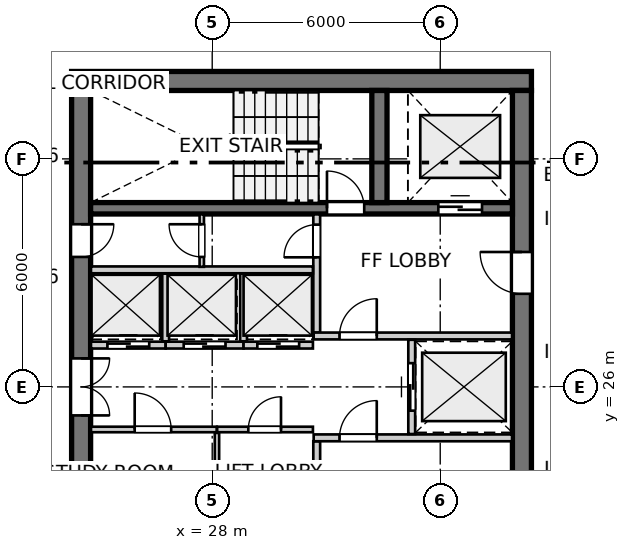
"""IFC4 building model, lengths in metres.
Left out: names, types, materials, properties, quantities, classifications, styles, units other than length and angle.
Written with IfcOpenShell. Run it as: python <this file> out.ifc"""

import sys

from ifc_helpers import new_model, si_unit, direction, frame, frame_2d, origin, place, context, subcontext, project, spatial, rectangle, extrude, source, transform, mapped, element, fill, save


model = new_model("IFC4")
c1 = context("Model", 3, precision=1e-05, world=origin(), true_north=direction((0.0, 1.0)))
c2 = subcontext(c1, "Body", "Model", "MODEL_VIEW")
j1 = project(units=[si_unit("LENGTHUNIT", "METRE"), si_unit("PLANEANGLEUNIT", "RADIAN")], contexts=[c1])
p1 = place(None, origin())
s1 = spatial("IfcSite", under=j1, at=p1, CompositionType="ELEMENT")
p2 = place(p1, origin())
s2 = spatial("IfcBuilding", under=s1, at=p2, CompositionType="ELEMENT")
p3 = place(p2, frame((0.0, 0.0, 208.4)))
s3 = spatial("IfcBuildingStorey", under=s2, at=p3, CompositionType="ELEMENT", Elevation=208.4)
p4 = place(p3, frame((36.4, 34.05, 0.0), z_axis=(0.0, 0.0, 1.0), x_axis=(-1.0, 0.0, 0.0)))
e1 = element("IfcWall", 1, at=p4, inside=s3, PredefinedType="SHEAR", context=c2, shape_type="SweptSolid", body=[
    extrude(rectangle(XDim=12.1, YDim=0.5, at=frame_2d((6.05, 0.0))), origin(), (0.0, 0.0, 1.0), 2.935),
])
p5 = place(p3, frame((24.55, 33.8, 0.0), z_axis=(0.0, 0.0, 1.0), x_axis=(0.0, -1.0, 0.0)))
e2 = element("IfcWall", 2, at=p5, inside=s3, PredefinedType="SHEAR", context=c2, shape_type="SweptSolid", body=[
    extrude(rectangle(XDim=15.6, YDim=0.5, at=frame_2d((7.8, 0.0))), origin(), (0.0, 0.0, 1.0), 2.935),
])
p6 = place(p5, frame((7.05, 0.0, 0.0)))
e3 = element("IfcOpeningElement", 3, at=p6, cuts=e2, PredefinedType="OPENING", context=c2, shape_type="SweptSolid", body=[
    extrude(rectangle(XDim=1.5, YDim=2.15, at=frame_2d((0.75, 1.075))), frame((0.0, 0.26, 0.0), z_axis=(0.0, -1.0, 0.0), x_axis=(1.0, 0.0, 0.0)), (0.0, 0.0, 1.0), 0.52),
])
p7 = place(p5, frame((3.52, 0.0, 0.0)))
e4 = element("IfcOpeningElement", 4, at=p7, cuts=e2, PredefinedType="OPENING", context=c2, shape_type="SweptSolid", body=[
    extrude(rectangle(XDim=0.86, YDim=2.05, at=frame_2d((0.43, 1.025))), frame((0.0, 0.26, 0.0), z_axis=(0.0, -1.0, 0.0), x_axis=(1.0, 0.0, 0.0)), (0.0, 0.0, 1.0), 0.52),
])
p8 = place(p5, frame((11.22, 0.0, 0.0)))
e5 = element("IfcOpeningElement", 5, at=p8, cuts=e2, PredefinedType="OPENING", context=c2, shape_type="SweptSolid", body=[
    extrude(rectangle(XDim=0.86, YDim=2.05, at=frame_2d((0.43, 1.025))), frame((0.0, 0.26, 0.0), z_axis=(0.0, -1.0, 0.0), x_axis=(1.0, 0.0, 0.0)), (0.0, 0.0, 1.0), 0.52),
])
p9 = place(p3, frame((36.15, 18.2, 0.0), z_axis=(0.0, 0.0, 1.0), x_axis=(0.0, 1.0, 0.0)))
e6 = element("IfcWall", 6, at=p9, inside=s3, PredefinedType="SHEAR", context=c2, shape_type="SweptSolid", body=[
    extrude(rectangle(XDim=15.6, YDim=0.5, at=frame_2d((7.8, 0.0))), origin(), (0.0, 0.0, 1.0), 2.935),
])
p10 = place(p9, frame((4.25, 0.0, 0.0)))
e7 = element("IfcOpeningElement", 7, at=p10, cuts=e6, PredefinedType="OPENING", context=c2, shape_type="SweptSolid", body=[
    extrude(rectangle(XDim=1.1, YDim=2.15, at=frame_2d((0.55, 1.075))), frame((0.0, 0.26, 0.0), z_axis=(0.0, -1.0, 0.0), x_axis=(1.0, 0.0, 0.0)), (0.0, 0.0, 1.0), 0.52),
])
p11 = place(p9, frame((10.25, 0.0, 0.0)))
e8 = element("IfcOpeningElement", 8, at=p11, cuts=e6, PredefinedType="OPENING", context=c2, shape_type="SweptSolid", body=[
    extrude(rectangle(XDim=1.1, YDim=2.15, at=frame_2d((0.55, 1.075))), frame((0.0, 0.26, 0.0), z_axis=(0.0, -1.0, 0.0), x_axis=(1.0, 0.0, 0.0)), (0.0, 0.0, 1.0), 0.52),
])
p12 = place(p3, frame((24.8, 30.7, 0.0), z_axis=(0.0, 0.0, 1.0), x_axis=(1.0, 0.0, 0.0)))
e9 = element("IfcWall", 9, at=p12, inside=s3, PredefinedType="SHEAR", context=c2, shape_type="SweptSolid", body=[
    extrude(rectangle(XDim=11.1, YDim=0.3, at=frame_2d((5.55, 0.0))), origin(), (0.0, 0.0, 1.0), 2.935),
])
p13 = place(p12, frame((6.22, 0.0, 0.0)))
e10 = element("IfcOpeningElement", 10, at=p13, cuts=e9, PredefinedType="OPENING", context=c2, shape_type="SweptSolid", body=[
    extrude(rectangle(XDim=0.98, YDim=2.15, at=frame_2d((0.49, 1.075))), frame((0.0, 0.16, 0.0), z_axis=(0.0, -1.0, 0.0), x_axis=(1.0, 0.0, 0.0)), (0.0, 0.0, 1.0), 0.32),
])
p14 = place(p12, frame((9.15, 0.0, 0.0)))
e11 = element("IfcOpeningElement", 11, at=p14, cuts=e9, PredefinedType="OPENING", context=c2, shape_type="SweptSolid", body=[
    extrude(rectangle(XDim=1.15, YDim=2.15, at=frame_2d((0.575, 1.075))), frame((0.0, 0.16, 0.0), z_axis=(0.0, -1.0, 0.0), x_axis=(1.0, 0.0, 0.0)), (0.0, 0.0, 1.0), 0.32),
])
p15 = place(p3, frame((32.4, 30.85, 0.0), z_axis=(0.0, 0.0, 1.0), x_axis=(0.0, 1.0, 0.0)))
e12 = element("IfcWall", 12, at=p15, inside=s3, PredefinedType="SHEAR", context=c2, shape_type="SweptSolid", body=[
    extrude(rectangle(XDim=2.95, YDim=0.4, at=frame_2d((1.475, 0.0))), origin(), (0.0, 0.0, 1.0), 2.935),
])
p16 = place(p3, frame((30.75, 21.46, 0.0), z_axis=(0.0, 0.0, 1.0), x_axis=(0.0, 1.0, 0.0)))
e13 = element("IfcWall", 13, at=p16, inside=s3, PredefinedType="PARTITIONING", context=c2, shape_type="SweptSolid", body=[
    extrude(rectangle(XDim=3.11, YDim=0.18, at=frame_2d((1.555, 0.0))), origin(), (0.0, 0.0, 1.0), 2.935),
])
p17 = place(p16, frame((0.26, 0.0, 0.0)))
e14 = element("IfcOpeningElement", 14, at=p17, cuts=e13, PredefinedType="OPENING", context=c2, shape_type="SweptSolid", body=[
    extrude(rectangle(XDim=0.86, YDim=2.05, at=frame_2d((0.43, 1.025))), frame((0.0, 0.1, 0.0), z_axis=(0.0, -1.0, 0.0), x_axis=(1.0, 0.0, 0.0)), (0.0, 0.0, 1.0), 0.2),
])
p18 = place(p3, frame((30.67, 24.66, 0.0), z_axis=(0.0, 0.0, 1.0), x_axis=(1.0, 0.0, 0.0)))
e15 = element("IfcWall", 15, at=p18, inside=s3, PredefinedType="PARTITIONING", context=c2, shape_type="SweptSolid", body=[
    extrude(rectangle(XDim=5.22, YDim=0.18, at=frame_2d((2.61, 0.0))), origin(), (0.0, 0.0, 1.0), 2.935),
])
p19 = place(p18, frame((0.68, 0.0, 0.0)))
e16 = element("IfcOpeningElement", 16, at=p19, cuts=e15, PredefinedType="OPENING", context=c2, shape_type="SweptSolid", body=[
    extrude(rectangle(XDim=0.98, YDim=2.15, at=frame_2d((0.49, 1.075))), frame((0.0, 0.1, 0.0), z_axis=(0.0, -1.0, 0.0), x_axis=(1.0, 0.0, 0.0)), (0.0, 0.0, 1.0), 0.2),
])
p20 = place(p3, frame((30.75, 27.43, 0.0), z_axis=(0.0, 0.0, 1.0), x_axis=(0.0, 1.0, 0.0)))
e17 = element("IfcWall", 17, at=p20, inside=s3, PredefinedType="PARTITIONING", context=c2, shape_type="SweptSolid", body=[
    extrude(rectangle(XDim=3.11, YDim=0.18, at=frame_2d((1.555, 0.0))), origin(), (0.0, 0.0, 1.0), 2.935),
])
p21 = place(p20, frame((1.98, 0.0, 0.0)))
e18 = element("IfcOpeningElement", 18, at=p21, cuts=e17, PredefinedType="OPENING", context=c2, shape_type="SweptSolid", body=[
    extrude(rectangle(XDim=0.86, YDim=2.05, at=frame_2d((0.43, 1.025))), frame((0.0, 0.1, 0.0), z_axis=(0.0, -1.0, 0.0), x_axis=(1.0, 0.0, 0.0)), (0.0, 0.0, 1.0), 0.2),
])
p22 = place(p3, frame((30.67, 27.34, 0.0), z_axis=(0.0, 0.0, 1.0), x_axis=(1.0, 0.0, 0.0)))
e19 = element("IfcWall", 19, at=p22, inside=s3, PredefinedType="PARTITIONING", context=c2, shape_type="SweptSolid", body=[
    extrude(rectangle(XDim=5.22, YDim=0.18, at=frame_2d((2.61, 0.0))), origin(), (0.0, 0.0, 1.0), 2.935),
])
p23 = place(p22, frame((0.68, 0.0, 0.0)))
e20 = element("IfcOpeningElement", 20, at=p23, cuts=e19, PredefinedType="OPENING", context=c2, shape_type="SweptSolid", body=[
    extrude(rectangle(XDim=0.98, YDim=2.15, at=frame_2d((0.49, 1.075))), frame((0.0, 0.1, 0.0), z_axis=(0.0, -1.0, 0.0), x_axis=(1.0, 0.0, 0.0)), (0.0, 0.0, 1.0), 0.2),
])
p24 = place(p3, frame((33.25, 24.76, 0.0), z_axis=(0.0, 0.0, 1.0), x_axis=(0.0, 1.0, 0.0)))
e21 = element("IfcWall", 21, at=p24, inside=s3, PredefinedType="PARTITIONING", context=c2, shape_type="SweptSolid", body=[
    extrude(rectangle(XDim=2.48, YDim=0.18, at=frame_2d((1.24, 0.0))), origin(), (0.0, 0.0, 1.0), 2.935),
])
p25 = place(p24, frame((0.615, 0.0, 0.0)))
e22 = element("IfcOpeningElement", 22, at=p25, cuts=e21, PredefinedType="OPENING", context=c2, shape_type="SweptSolid", body=[
    extrude(rectangle(XDim=1.25, YDim=2.15, at=frame_2d((0.625, 1.075))), frame((0.0, 0.1, 0.0), z_axis=(0.0, -1.0, 0.0), x_axis=(1.0, 0.0, 0.0)), (0.0, 0.0, 1.0), 0.2),
])
p26 = place(p3, frame((24.81, 24.88, 0.0), z_axis=(0.0, 0.0, 1.0), x_axis=(1.0, 0.0, 0.0)))
e23 = element("IfcWall", 23, at=p26, inside=s3, PredefinedType="PARTITIONING", context=c2, shape_type="SweptSolid", body=[
    extrude(rectangle(XDim=3.31, YDim=0.145, at=frame_2d((1.655, 0.0))), origin(), (0.0, 0.0, 1.0), 2.935),
])
p27 = place(p26, frame((1.15, 0.0, 0.0)))
e24 = element("IfcOpeningElement", 24, at=p27, cuts=e23, PredefinedType="OPENING", context=c2, shape_type="SweptSolid", body=[
    extrude(rectangle(XDim=0.96, YDim=2.1, at=frame_2d((0.48, 1.05))), frame((0.0, 0.083, 0.0), z_axis=(0.0, -1.0, 0.0), x_axis=(1.0, 0.0, 0.0)), (0.0, 0.0, 1.0), 0.165),
])
p28 = place(p3, frame((28.13, 24.88, 0.0), z_axis=(0.0, 0.0, 1.0), x_axis=(1.0, 0.0, 0.0)))
e25 = element("IfcWall", 25, at=p28, inside=s3, PredefinedType="PARTITIONING", context=c2, shape_type="SweptSolid", body=[
    extrude(rectangle(XDim=2.52, YDim=0.145, at=frame_2d((1.26, 0.0))), origin(), (0.0, 0.0, 1.0), 2.935),
])
p29 = place(p28, frame((0.82, 0.0, 0.0)))
e26 = element("IfcOpeningElement", 26, at=p29, cuts=e25, PredefinedType="OPENING", context=c2, shape_type="SweptSolid", body=[
    extrude(rectangle(XDim=0.86, YDim=2.05, at=frame_2d((0.43, 1.025))), frame((0.0, 0.083, 0.0), z_axis=(0.0, -1.0, 0.0), x_axis=(1.0, 0.0, 0.0)), (0.0, 0.0, 1.0), 0.165),
])
p30 = place(p3, frame((28.125, 23.02, 0.0), z_axis=(0.0, 0.0, 1.0), x_axis=(0.0, 1.0, 0.0)))
e27 = element("IfcWall", 27, at=p30, inside=s3, PredefinedType="PARTITIONING", context=c2, shape_type="SweptSolid", body=[
    extrude(rectangle(XDim=1.77, YDim=0.115, at=frame_2d((0.885, 0.0))), origin(), (0.0, 0.0, 1.0), 2.935),
])
p31 = place(p3, frame((24.81, 29.08, 0.0), z_axis=(0.0, 0.0, 1.0), x_axis=(1.0, 0.0, 0.0)))
e28 = element("IfcWall", 28, at=p31, inside=s3, PredefinedType="PARTITIONING", context=c2, shape_type="SweptSolid", body=[
    extrude(rectangle(XDim=5.84, YDim=0.18, at=frame_2d((2.92, 0.0))), origin(), (0.0, 0.0, 1.0), 2.935),
])
p32 = place(p3, frame((24.81, 27.1, 0.0), z_axis=(0.0, 0.0, 1.0), x_axis=(1.0, 0.0, 0.0)))
e29 = element("IfcWall", 29, at=p32, inside=s3, PredefinedType="PARTITIONING", context=c2, shape_type="SweptSolid", body=[
    extrude(rectangle(XDim=1.965, YDim=0.18, at=frame_2d((0.982, 0.0))), origin(), (0.0, 0.0, 1.0), 2.935),
])
p33 = place(p32, frame((0.433, 0.0, 0.0)))
e30 = element("IfcOpeningElement", 30, at=p33, cuts=e29, PredefinedType="OPENING", context=c2, shape_type="SweptSolid", body=[
    extrude(rectangle(XDim=1.1, YDim=2.15, at=frame_2d((0.55, 1.075))), frame((0.0, 0.1, 0.0), z_axis=(0.0, -1.0, 0.0), x_axis=(1.0, 0.0, 0.0)), (0.0, 0.0, 1.0), 0.2),
])
p34 = place(p3, frame((26.775, 27.1, 0.0), z_axis=(0.0, 0.0, 1.0), x_axis=(1.0, 0.0, 0.0)))
e31 = element("IfcWall", 31, at=p34, inside=s3, PredefinedType="PARTITIONING", context=c2, shape_type="SweptSolid", body=[
    extrude(rectangle(XDim=2.05, YDim=0.18, at=frame_2d((1.025, 0.0))), origin(), (0.0, 0.0, 1.0), 2.935),
])
p35 = place(p34, frame((0.475, 0.0, 0.0)))
e32 = element("IfcOpeningElement", 32, at=p35, cuts=e31, PredefinedType="OPENING", context=c2, shape_type="SweptSolid", body=[
    extrude(rectangle(XDim=1.1, YDim=2.15, at=frame_2d((0.55, 1.075))), frame((0.0, 0.1, 0.0), z_axis=(0.0, -1.0, 0.0), x_axis=(1.0, 0.0, 0.0)), (0.0, 0.0, 1.0), 0.2),
])
p36 = place(p3, frame((26.775, 27.2, 0.0), z_axis=(0.0, 0.0, 1.0), x_axis=(0.0, 1.0, 0.0)))
e33 = element("IfcWall", 33, at=p36, inside=s3, PredefinedType="PARTITIONING", context=c2, shape_type="SweptSolid", body=[
    extrude(rectangle(XDim=1.78, YDim=0.18, at=frame_2d((0.89, 0.0))), origin(), (0.0, 0.0, 1.0), 2.935),
])
p37 = place(p3, frame((28.825, 27.1, 0.0), z_axis=(0.0, 0.0, 1.0), x_axis=(1.0, 0.0, 0.0)))
e34 = element("IfcWall", 34, at=p37, inside=s3, PredefinedType="PARTITIONING", context=c2, shape_type="SweptSolid", body=[
    extrude(rectangle(XDim=1.825, YDim=0.18, at=frame_2d((0.913, 0.0))), origin(), (0.0, 0.0, 1.0), 2.935),
])
p38 = place(p37, frame((0.363, 0.0, 0.0)))
e35 = element("IfcOpeningElement", 35, at=p38, cuts=e34, PredefinedType="OPENING", context=c2, shape_type="SweptSolid", body=[
    extrude(rectangle(XDim=1.1, YDim=2.15, at=frame_2d((0.55, 1.075))), frame((0.0, 0.1, 0.0), z_axis=(0.0, -1.0, 0.0), x_axis=(1.0, 0.0, 0.0)), (0.0, 0.0, 1.0), 0.2),
])
p39 = place(p3, frame((28.825, 27.2, 0.0), z_axis=(0.0, 0.0, 1.0), x_axis=(0.0, 1.0, 0.0)))
e36 = element("IfcWall", 36, at=p39, inside=s3, PredefinedType="PARTITIONING", context=c2, shape_type="SweptSolid", body=[
    extrude(rectangle(XDim=1.78, YDim=0.18, at=frame_2d((0.89, 0.0))), origin(), (0.0, 0.0, 1.0), 2.935),
])
p40 = place(p3, frame((27.725, 29.16, 0.0), z_axis=(0.0, 0.0, 1.0), x_axis=(0.0, 1.0, 0.0)))
e37 = element("IfcWall", 37, at=p40, inside=s3, PredefinedType="PARTITIONING", context=c2, shape_type="SweptSolid", body=[
    extrude(rectangle(XDim=1.38, YDim=0.115, at=frame_2d((0.69, 0.0))), origin(), (0.0, 0.0, 1.0), 2.935),
])
p41 = place(p40, frame((0.26, 0.0, 0.0)))
e38 = element("IfcOpeningElement", 38, at=p41, cuts=e37, PredefinedType="OPENING", context=c2, shape_type="SweptSolid", body=[
    extrude(rectangle(XDim=0.86, YDim=2.05, at=frame_2d((0.43, 1.025))), frame((0.0, 0.067, 0.0), z_axis=(0.0, -1.0, 0.0), x_axis=(1.0, 0.0, 0.0)), (0.0, 0.0, 1.0), 0.135),
])
m1 = source(origin(), c2, "Body", "SweptSolid", [
    extrude(rectangle(XDim=0.98, YDim=2.15, at=frame_2d((0.49, 1.075))), frame((0.0, 0.025, 0.0), z_axis=(0.0, -1.0, 0.0), x_axis=(1.0, 0.0, 0.0)), (0.0, 0.0, 1.0), 0.05),
])
p42 = place(p13, origin())
e39 = element("IfcDoor", 39, at=p42, inside=s3, OperationType="SINGLE_SWING_LEFT", PredefinedType="DOOR", context=c2, shape_type="MappedRepresentation", body=[
    mapped(m1, transform((0.0, 0.0, 0.0), x_axis=(1.0, 0.0, 0.0), y_axis=(0.0, 1.0, 0.0), z_axis=(0.0, 0.0, 1.0), scale=1.0)),
])
fill(e10, e39)
m2 = source(origin(), c2, "Body", "SweptSolid", [
    extrude(rectangle(XDim=1.15, YDim=2.15, at=frame_2d((0.575, 1.075))), frame((0.0, 0.025, 0.0), z_axis=(0.0, -1.0, 0.0), x_axis=(1.0, 0.0, 0.0)), (0.0, 0.0, 1.0), 0.05),
])
p43 = place(p14, origin())
e40 = element("IfcDoor", 40, at=p43, inside=s3, OperationType="DOUBLE_DOOR_SLIDING", PredefinedType="DOOR", context=c2, shape_type="MappedRepresentation", body=[
    mapped(m2, transform((0.0, 0.0, 0.0), x_axis=(1.0, 0.0, 0.0), y_axis=(0.0, 1.0, 0.0), z_axis=(0.0, 0.0, 1.0), scale=1.0)),
])
fill(e11, e40)
m3 = source(origin(), c2, "Body", "SweptSolid", [
    extrude(rectangle(XDim=1.1, YDim=2.15, at=frame_2d((0.55, 1.075))), frame((0.0, 0.025, 0.0), z_axis=(0.0, -1.0, 0.0), x_axis=(1.0, 0.0, 0.0)), (0.0, 0.0, 1.0), 0.05),
])
p44 = place(p11, origin())
e41 = element("IfcDoor", 41, at=p44, inside=s3, OperationType="SINGLE_SWING_RIGHT", PredefinedType="DOOR", context=c2, shape_type="MappedRepresentation", body=[
    mapped(m3, transform((0.0, 0.0, 0.0), x_axis=(1.0, 0.0, 0.0), y_axis=(0.0, 1.0, 0.0), z_axis=(0.0, 0.0, 1.0), scale=1.0)),
])
fill(e8, e41)
m4 = source(origin(), c2, "Body", "SweptSolid", [
    extrude(rectangle(XDim=1.5, YDim=2.15, at=frame_2d((0.75, 1.075))), frame((0.0, 0.025, 0.0), z_axis=(0.0, -1.0, 0.0), x_axis=(1.0, 0.0, 0.0)), (0.0, 0.0, 1.0), 0.05),
])
p45 = place(p6, origin())
e42 = element("IfcDoor", 42, at=p45, inside=s3, OperationType="DOUBLE_DOOR_SINGLE_SWING", PredefinedType="DOOR", context=c2, shape_type="MappedRepresentation", body=[
    mapped(m4, transform((0.0, 0.0, 0.0), x_axis=(1.0, 0.0, 0.0), y_axis=(0.0, 1.0, 0.0), z_axis=(0.0, 0.0, 1.0), scale=1.0)),
])
fill(e3, e42)
m5 = source(origin(), c2, "Body", "SweptSolid", [
    extrude(rectangle(XDim=0.86, YDim=2.05, at=frame_2d((0.43, 1.025))), frame((0.0, 0.025, 0.0), z_axis=(0.0, -1.0, 0.0), x_axis=(1.0, 0.0, 0.0)), (0.0, 0.0, 1.0), 0.05),
])
p46 = place(p7, origin())
e43 = element("IfcDoor", 43, at=p46, inside=s3, OperationType="SINGLE_SWING_LEFT", PredefinedType="DOOR", context=c2, shape_type="MappedRepresentation", body=[
    mapped(m5, transform((0.0, 0.0, 0.0), x_axis=(1.0, 0.0, 0.0), y_axis=(0.0, 1.0, 0.0), z_axis=(0.0, 0.0, 1.0), scale=1.0)),
])
fill(e4, e43)
p47 = place(p19, origin())
e44 = element("IfcDoor", 44, at=p47, inside=s3, OperationType="SINGLE_SWING_RIGHT", PredefinedType="DOOR", context=c2, shape_type="MappedRepresentation", body=[
    mapped(m1, transform((0.0, 0.0, 0.0), x_axis=(1.0, 0.0, 0.0), y_axis=(0.0, 1.0, 0.0), z_axis=(0.0, 0.0, 1.0), scale=1.0)),
])
fill(e16, e44)
p48 = place(p21, origin())
e45 = element("IfcDoor", 45, at=p48, inside=s3, OperationType="SINGLE_SWING_LEFT", PredefinedType="DOOR", context=c2, shape_type="MappedRepresentation", body=[
    mapped(m5, transform((0.0, 0.0, 0.0), x_axis=(1.0, 0.0, 0.0), y_axis=(0.0, 1.0, 0.0), z_axis=(0.0, 0.0, 1.0), scale=1.0)),
])
fill(e18, e45)
p49 = place(p23, origin())
e46 = element("IfcDoor", 46, at=p49, inside=s3, OperationType="SINGLE_SWING_RIGHT", PredefinedType="DOOR", context=c2, shape_type="MappedRepresentation", body=[
    mapped(m1, transform((0.0, 0.0, 0.0), x_axis=(1.0, 0.0, 0.0), y_axis=(0.0, 1.0, 0.0), z_axis=(0.0, 0.0, 1.0), scale=1.0)),
])
fill(e20, e46)
m6 = source(origin(), c2, "Body", "SweptSolid", [
    extrude(rectangle(XDim=1.25, YDim=2.15, at=frame_2d((0.625, 1.075))), frame((0.0, 0.025, 0.0), z_axis=(0.0, -1.0, 0.0), x_axis=(1.0, 0.0, 0.0)), (0.0, 0.0, 1.0), 0.05),
])
p50 = place(p25, origin())
e47 = element("IfcDoor", 47, at=p50, inside=s3, OperationType="DOUBLE_DOOR_SLIDING", PredefinedType="DOOR", context=c2, shape_type="MappedRepresentation", body=[
    mapped(m6, transform((0.0, 0.0, 0.0), x_axis=(1.0, 0.0, 0.0), y_axis=(0.0, 1.0, 0.0), z_axis=(0.0, 0.0, 1.0), scale=1.0)),
])
fill(e22, e47)
m7 = source(origin(), c2, "Body", "SweptSolid", [
    extrude(rectangle(XDim=0.96, YDim=2.1, at=frame_2d((0.48, 1.05))), frame((0.0, 0.025, 0.0), z_axis=(0.0, -1.0, 0.0), x_axis=(1.0, 0.0, 0.0)), (0.0, 0.0, 1.0), 0.05),
])
p51 = place(p27, origin())
e48 = element("IfcDoor", 48, at=p51, inside=s3, OperationType="SINGLE_SWING_LEFT", PredefinedType="DOOR", context=c2, shape_type="MappedRepresentation", body=[
    mapped(m7, transform((0.0, 0.0, 0.0), x_axis=(1.0, 0.0, 0.0), y_axis=(0.0, 1.0, 0.0), z_axis=(0.0, 0.0, 1.0), scale=1.0)),
])
fill(e24, e48)
p52 = place(p29, origin())
e49 = element("IfcDoor", 49, at=p52, inside=s3, OperationType="SINGLE_SWING_RIGHT", PredefinedType="DOOR", context=c2, shape_type="MappedRepresentation", body=[
    mapped(m5, transform((0.0, 0.0, 0.0), x_axis=(1.0, 0.0, 0.0), y_axis=(0.0, 1.0, 0.0), z_axis=(0.0, 0.0, 1.0), scale=1.0)),
])
fill(e26, e49)
p53 = place(p33, origin())
e50 = element("IfcDoor", 50, at=p53, inside=s3, OperationType="DOUBLE_DOOR_SLIDING", PredefinedType="DOOR", context=c2, shape_type="MappedRepresentation", body=[
    mapped(m3, transform((0.0, 0.0, 0.0), x_axis=(1.0, 0.0, 0.0), y_axis=(0.0, 1.0, 0.0), z_axis=(0.0, 0.0, 1.0), scale=1.0)),
])
fill(e30, e50)
p54 = place(p35, origin())
e51 = element("IfcDoor", 51, at=p54, inside=s3, OperationType="DOUBLE_DOOR_SLIDING", PredefinedType="DOOR", context=c2, shape_type="MappedRepresentation", body=[
    mapped(m3, transform((0.0, 0.0, 0.0), x_axis=(1.0, 0.0, 0.0), y_axis=(0.0, 1.0, 0.0), z_axis=(0.0, 0.0, 1.0), scale=1.0)),
])
fill(e32, e51)
p55 = place(p38, origin())
e52 = element("IfcDoor", 52, at=p55, inside=s3, OperationType="DOUBLE_DOOR_SLIDING", PredefinedType="DOOR", context=c2, shape_type="MappedRepresentation", body=[
    mapped(m3, transform((0.0, 0.0, 0.0), x_axis=(1.0, 0.0, 0.0), y_axis=(0.0, 1.0, 0.0), z_axis=(0.0, 0.0, 1.0), scale=1.0)),
])
fill(e35, e52)
p56 = place(p41, origin())
e53 = element("IfcDoor", 53, at=p56, inside=s3, OperationType="SINGLE_SWING_RIGHT", PredefinedType="DOOR", context=c2, shape_type="MappedRepresentation", body=[
    mapped(m5, transform((0.0, 0.0, 0.0), x_axis=(1.0, 0.0, 0.0), y_axis=(0.0, 1.0, 0.0), z_axis=(0.0, 0.0, 1.0), scale=1.0)),
])
fill(e38, e53)
save(model, sys.argv[1])
